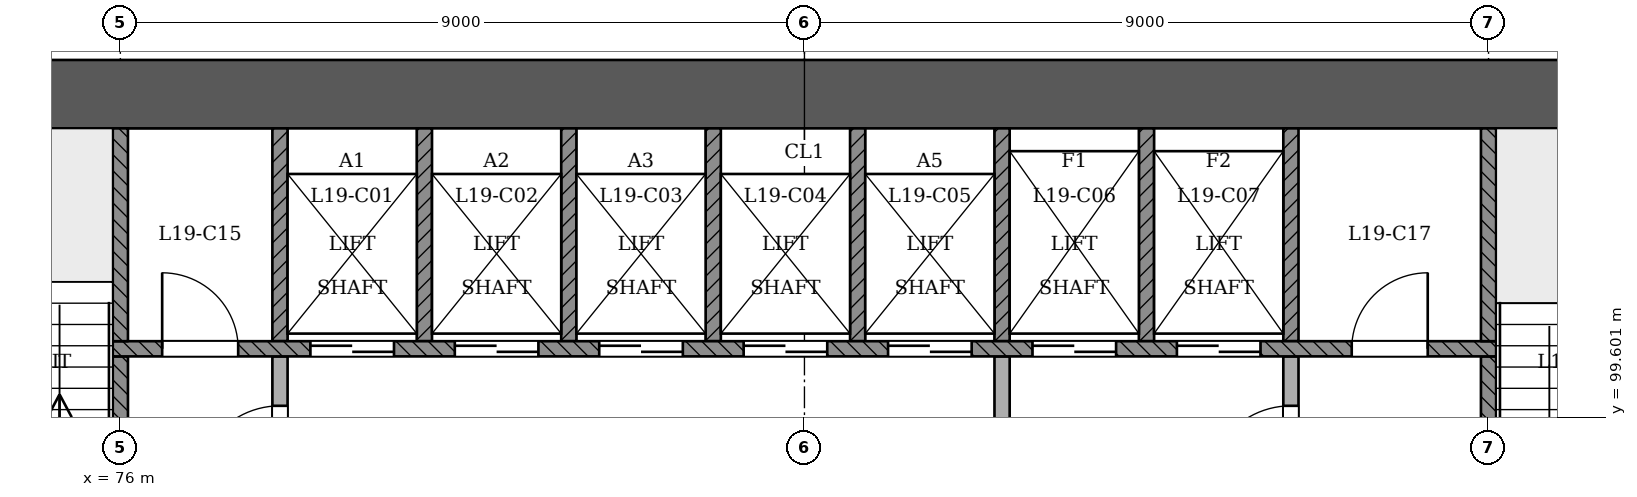
"""IFC4 building model, lengths in metres.
Left out: names, types, materials, properties, quantities, classifications, styles, units other than length and angle.
Written with IfcOpenShell. Run it as: python <this file> out.ifc"""

import sys

from ifc_helpers import new_model, si_unit, direction, frame, frame_2d, origin, place, context, subcontext, project, spatial, rectangle, extrude, element, fill, save


model = new_model("IFC4")
c1 = context("Model", 3, precision=1e-05, world=origin(), true_north=direction((0.0, 1.0)))
c2 = subcontext(c1, "Body", "Model", "MODEL_VIEW")
j1 = project(units=[si_unit("LENGTHUNIT", "METRE"), si_unit("PLANEANGLEUNIT", "RADIAN")], contexts=[c1])
p1 = place(None, origin())
s1 = spatial("IfcSite", under=j1, at=p1, CompositionType="ELEMENT")
p2 = place(p1, origin())
s2 = spatial("IfcBuilding", under=s1, at=p2, CompositionType="ELEMENT")
p3 = place(p2, frame((0.0, 0.0, 77.4)))
s3 = spatial("IfcBuildingStorey", under=s2, at=p3, CompositionType="ELEMENT", Elevation=77.4)
p4 = place(p3, frame((97.45, 103.85, 0.0), z_axis=(0.0, 0.0, 1.0), x_axis=(-1.0, 0.0, 0.0)))
e1 = element("IfcWall", 1, at=p4, inside=s3, PredefinedType="SHEAR", context=c2, shape_type="SweptSolid", body=[
    extrude(rectangle(XDim=25.35, YDim=0.9, at=frame_2d((12.675, 0.0))), origin(), (0.0, 0.0, 1.0), 3.6),
])
p5 = place(p3, frame((87.6, 93.4, 0.0), z_axis=(0.0, 0.0, 1.0), x_axis=(0.0, 1.0, 0.0)))
e2 = element("IfcWall", 2, at=p5, inside=s3, PredefinedType="PARTITIONING", context=c2, shape_type="SweptSolid", body=[
    extrude(rectangle(XDim=7.0, YDim=0.2, at=frame_2d((3.5, 0.0))), origin(), (0.0, 0.0, 1.0), 3.1),
])
p6 = place(p5, frame((4.45, 0.0, 0.0)))
e3 = element("IfcOpeningElement", 3, at=p6, cuts=e2, PredefinedType="OPENING", context=c2, shape_type="SweptSolid", body=[
    extrude(rectangle(XDim=1.1, YDim=2.1, at=frame_2d((0.55, 1.05))), frame((0.0, 0.11, 0.0), z_axis=(0.0, -1.0, 0.0), x_axis=(1.0, 0.0, 0.0)), (0.0, 0.0, 1.0), 0.221),
])
p7 = place(p3, frame((91.4, 96.2, 0.0), z_axis=(0.0, 0.0, 1.0), x_axis=(0.0, 1.0, 0.0)))
e4 = element("IfcWall", 4, at=p7, inside=s3, PredefinedType="PARTITIONING", context=c2, shape_type="SweptSolid", body=[
    extrude(rectangle(XDim=4.2, YDim=0.2, at=frame_2d((2.1, 0.0))), origin(), (0.0, 0.0, 1.0), 3.1),
])
p8 = place(p7, frame((2.45, 0.0, 0.0)))
e5 = element("IfcOpeningElement", 5, at=p8, cuts=e4, PredefinedType="OPENING", context=c2, shape_type="SweptSolid", body=[
    extrude(rectangle(XDim=1.1, YDim=2.1, at=frame_2d((0.55, 1.05))), frame((0.0, 0.11, 0.0), z_axis=(0.0, -1.0, 0.0), x_axis=(1.0, 0.0, 0.0)), (0.0, 0.0, 1.0), 0.221),
])
p9 = place(p3, frame((76.0, 96.7, 0.0), z_axis=(0.0, 0.0, 1.0), x_axis=(0.0, 1.0, 0.0)))
e6 = element("IfcWall", 6, at=p9, inside=s3, PredefinedType="SOLIDWALL", context=c2, shape_type="SweptSolid", body=[
    extrude(rectangle(XDim=3.7, YDim=0.2, at=frame_2d((1.85, 0.0))), origin(), (0.0, 0.0, 1.0), 3.1),
])
p10 = place(p9, frame((0.35, 0.0, 0.0)))
e7 = element("IfcOpeningElement", 7, at=p10, cuts=e6, PredefinedType="OPENING", context=c2, shape_type="SweptSolid", body=[
    extrude(rectangle(XDim=1.1, YDim=2.1, at=frame_2d((0.55, 1.05))), frame((0.0, 0.11, 0.0), z_axis=(0.0, -1.0, 0.0), x_axis=(1.0, 0.0, 0.0)), (0.0, 0.0, 1.0), 0.221),
])
p11 = place(p3, frame((78.1, 96.7, 0.0), z_axis=(0.0, 0.0, 1.0), x_axis=(0.0, 1.0, 0.0)))
e8 = element("IfcWall", 8, at=p11, inside=s3, PredefinedType="PARTITIONING", context=c2, shape_type="SweptSolid", body=[
    extrude(rectangle(XDim=3.7, YDim=0.2, at=frame_2d((1.85, 0.0))), origin(), (0.0, 0.0, 1.0), 3.1),
])
p12 = place(p11, frame((1.95, 0.0, 0.0)))
e9 = element("IfcOpeningElement", 9, at=p12, cuts=e8, PredefinedType="OPENING", context=c2, shape_type="SweptSolid", body=[
    extrude(rectangle(XDim=1.1, YDim=2.1, at=frame_2d((0.55, 1.05))), frame((0.0, 0.11, 0.0), z_axis=(0.0, -1.0, 0.0), x_axis=(1.0, 0.0, 0.0)), (0.0, 0.0, 1.0), 0.221),
])
p13 = place(p3, frame((94.0, 96.7, 0.0), z_axis=(0.0, 0.0, 1.0), x_axis=(0.0, 1.0, 0.0)))
e10 = element("IfcWall", 10, at=p13, inside=s3, PredefinedType="SOLIDWALL", context=c2, shape_type="SweptSolid", body=[
    extrude(rectangle(XDim=3.7, YDim=0.2, at=frame_2d((1.85, 0.0))), origin(), (0.0, 0.0, 1.0), 3.1),
])
p14 = place(p13, frame((0.35, 0.0, 0.0)))
e11 = element("IfcOpeningElement", 11, at=p14, cuts=e10, PredefinedType="OPENING", context=c2, shape_type="SweptSolid", body=[
    extrude(rectangle(XDim=1.1, YDim=2.1, at=frame_2d((0.55, 1.05))), frame((0.0, 0.11, 0.0), z_axis=(0.0, -1.0, 0.0), x_axis=(1.0, 0.0, 0.0)), (0.0, 0.0, 1.0), 0.221),
])
p15 = place(p3, frame((75.9, 100.5, 0.0), z_axis=(0.0, 0.0, 1.0), x_axis=(1.0, 0.0, 0.0)))
e12 = element("IfcWall", 12, at=p15, inside=s3, PredefinedType="SOLIDWALL", context=c2, shape_type="SweptSolid", body=[
    extrude(rectangle(XDim=18.2, YDim=0.2, at=frame_2d((9.1, 0.0))), origin(), (0.0, 0.0, 1.0), 3.1),
])
p16 = place(p15, frame((2.6, 0.0, 0.0)))
e13 = element("IfcOpeningElement", 13, at=p16, cuts=e12, PredefinedType="OPENING", context=c2, shape_type="SweptSolid", body=[
    extrude(rectangle(XDim=1.1, YDim=2.1, at=frame_2d((0.55, 1.05))), frame((0.0, 0.11, 0.0), z_axis=(0.0, -1.0, 0.0), x_axis=(1.0, 0.0, 0.0)), (0.0, 0.0, 1.0), 0.221),
])
p17 = place(p15, frame((4.5, 0.0, 0.0)))
e14 = element("IfcOpeningElement", 14, at=p17, cuts=e12, PredefinedType="OPENING", context=c2, shape_type="SweptSolid", body=[
    extrude(rectangle(XDim=1.1, YDim=2.1, at=frame_2d((0.55, 1.05))), frame((0.0, 0.11, 0.0), z_axis=(0.0, -1.0, 0.0), x_axis=(1.0, 0.0, 0.0)), (0.0, 0.0, 1.0), 0.221),
])
p18 = place(p15, frame((6.4, 0.0, 0.0)))
e15 = element("IfcOpeningElement", 15, at=p18, cuts=e12, PredefinedType="OPENING", context=c2, shape_type="SweptSolid", body=[
    extrude(rectangle(XDim=1.1, YDim=2.1, at=frame_2d((0.55, 1.05))), frame((0.0, 0.11, 0.0), z_axis=(0.0, -1.0, 0.0), x_axis=(1.0, 0.0, 0.0)), (0.0, 0.0, 1.0), 0.221),
])
p19 = place(p15, frame((8.3, 0.0, 0.0)))
e16 = element("IfcOpeningElement", 16, at=p19, cuts=e12, PredefinedType="OPENING", context=c2, shape_type="SweptSolid", body=[
    extrude(rectangle(XDim=1.1, YDim=2.1, at=frame_2d((0.55, 1.05))), frame((0.0, 0.11, 0.0), z_axis=(0.0, -1.0, 0.0), x_axis=(1.0, 0.0, 0.0)), (0.0, 0.0, 1.0), 0.221),
])
p20 = place(p15, frame((10.2, 0.0, 0.0)))
e17 = element("IfcOpeningElement", 17, at=p20, cuts=e12, PredefinedType="OPENING", context=c2, shape_type="SweptSolid", body=[
    extrude(rectangle(XDim=1.1, YDim=2.1, at=frame_2d((0.55, 1.05))), frame((0.0, 0.11, 0.0), z_axis=(0.0, -1.0, 0.0), x_axis=(1.0, 0.0, 0.0)), (0.0, 0.0, 1.0), 0.221),
])
p21 = place(p15, frame((12.1, 0.0, 0.0)))
e18 = element("IfcOpeningElement", 18, at=p21, cuts=e12, PredefinedType="OPENING", context=c2, shape_type="SweptSolid", body=[
    extrude(rectangle(XDim=1.1, YDim=2.1, at=frame_2d((0.55, 1.05))), frame((0.0, 0.11, 0.0), z_axis=(0.0, -1.0, 0.0), x_axis=(1.0, 0.0, 0.0)), (0.0, 0.0, 1.0), 0.221),
])
p22 = place(p15, frame((14.0, 0.0, 0.0)))
e19 = element("IfcOpeningElement", 19, at=p22, cuts=e12, PredefinedType="OPENING", context=c2, shape_type="SweptSolid", body=[
    extrude(rectangle(XDim=1.1, YDim=2.1, at=frame_2d((0.55, 1.05))), frame((0.0, 0.11, 0.0), z_axis=(0.0, -1.0, 0.0), x_axis=(1.0, 0.0, 0.0)), (0.0, 0.0, 1.0), 0.221),
])
p23 = place(p15, frame((0.65, 0.0, 0.0)))
e20 = element("IfcOpeningElement", 20, at=p23, cuts=e12, PredefinedType="OPENING", context=c2, shape_type="SweptSolid", body=[
    extrude(rectangle(XDim=1.0, YDim=2.1, at=frame_2d((0.5, 1.05))), frame((0.0, 0.11, 0.0), z_axis=(0.0, -1.0, 0.0), x_axis=(1.0, 0.0, 0.0)), (0.0, 0.0, 1.0), 0.221),
])
p24 = place(p15, frame((16.3, 0.0, 0.0)))
e21 = element("IfcOpeningElement", 21, at=p24, cuts=e12, PredefinedType="OPENING", context=c2, shape_type="SweptSolid", body=[
    extrude(rectangle(XDim=1.0, YDim=2.1, at=frame_2d((0.5, 1.05))), frame((0.0, 0.11, 0.0), z_axis=(0.0, -1.0, 0.0), x_axis=(1.0, 0.0, 0.0)), (0.0, 0.0, 1.0), 0.221),
])
for number, where, z_axis, x_axis in (
    (22, (76.0, 100.6, 0.0), (0.0, 0.0, 1.0), (0.0, 1.0, 0.0)),
    (23, (78.1, 100.6, 0.0), (0.0, 0.0, 1.0), (0.0, 1.0, 0.0)),
    (24, (80.0, 100.6, 0.0), (0.0, 0.0, 1.0), (0.0, 1.0, 0.0)),
    (25, (81.9, 100.6, 0.0), (0.0, 0.0, 1.0), (0.0, 1.0, 0.0)),
    (26, (83.8, 100.6, 0.0), (0.0, 0.0, 1.0), (0.0, 1.0, 0.0)),
    (27, (85.7, 100.6, 0.0), (0.0, 0.0, 1.0), (0.0, 1.0, 0.0)),
    (28, (87.6, 100.6, 0.0), (0.0, 0.0, 1.0), (0.0, 1.0, 0.0)),
    (29, (89.5, 100.6, 0.0), (0.0, 0.0, 1.0), (0.0, 1.0, 0.0)),
    (30, (91.4, 100.6, 0.0), (0.0, 0.0, 1.0), (0.0, 1.0, 0.0)),
    (31, (94.0, 100.6, 0.0), (0.0, 0.0, 1.0), (0.0, 1.0, 0.0)),
):
    element("IfcWall", number, at=place(p3, frame(where, z_axis=z_axis, x_axis=x_axis)), inside=s3, PredefinedType="SOLIDWALL", context=c2, shape_type="SweptSolid", body=[
        extrude(rectangle(XDim=2.8, YDim=0.2, at=frame_2d((1.4, 0.0))), origin(), (0.0, 0.0, 1.0), 3.1),
    ])
p25 = place(p16, origin())
e32 = element("IfcDoor", 32, at=p25, inside=s3, OperationType="SLIDING_TO_RIGHT", PredefinedType="NOTDEFINED", context=c2, shape_type="SweptSolid", body=[
    extrude(rectangle(XDim=1.1, YDim=2.1, at=frame_2d((0.55, 1.05))), frame((0.0, 0.025, 0.0), z_axis=(0.0, -1.0, 0.0), x_axis=(1.0, 0.0, 0.0)), (0.0, 0.0, 1.0), 0.05),
])
fill(e13, e32)
p26 = place(p17, origin())
e33 = element("IfcDoor", 33, at=p26, inside=s3, OperationType="SLIDING_TO_LEFT", PredefinedType="NOTDEFINED", context=c2, shape_type="SweptSolid", body=[
    extrude(rectangle(XDim=1.1, YDim=2.1, at=frame_2d((0.55, 1.05))), frame((0.0, 0.025, 0.0), z_axis=(0.0, -1.0, 0.0), x_axis=(1.0, 0.0, 0.0)), (0.0, 0.0, 1.0), 0.05),
])
fill(e14, e33)
p27 = place(p18, origin())
e34 = element("IfcDoor", 34, at=p27, inside=s3, OperationType="SLIDING_TO_RIGHT", PredefinedType="NOTDEFINED", context=c2, shape_type="SweptSolid", body=[
    extrude(rectangle(XDim=1.1, YDim=2.1, at=frame_2d((0.55, 1.05))), frame((0.0, 0.025, 0.0), z_axis=(0.0, -1.0, 0.0), x_axis=(1.0, 0.0, 0.0)), (0.0, 0.0, 1.0), 0.05),
])
fill(e15, e34)
p28 = place(p19, origin())
e35 = element("IfcDoor", 35, at=p28, inside=s3, OperationType="SLIDING_TO_LEFT", PredefinedType="NOTDEFINED", context=c2, shape_type="SweptSolid", body=[
    extrude(rectangle(XDim=1.1, YDim=2.1, at=frame_2d((0.55, 1.05))), frame((0.0, 0.025, 0.0), z_axis=(0.0, -1.0, 0.0), x_axis=(1.0, 0.0, 0.0)), (0.0, 0.0, 1.0), 0.05),
])
fill(e16, e35)
p29 = place(p20, origin())
e36 = element("IfcDoor", 36, at=p29, inside=s3, OperationType="SLIDING_TO_RIGHT", PredefinedType="NOTDEFINED", context=c2, shape_type="SweptSolid", body=[
    extrude(rectangle(XDim=1.1, YDim=2.1, at=frame_2d((0.55, 1.05))), frame((0.0, 0.025, 0.0), z_axis=(0.0, -1.0, 0.0), x_axis=(1.0, 0.0, 0.0)), (0.0, 0.0, 1.0), 0.05),
])
fill(e17, e36)
p30 = place(p21, origin())
e37 = element("IfcDoor", 37, at=p30, inside=s3, OperationType="SLIDING_TO_RIGHT", PredefinedType="NOTDEFINED", context=c2, shape_type="SweptSolid", body=[
    extrude(rectangle(XDim=1.1, YDim=2.1, at=frame_2d((0.55, 1.05))), frame((0.0, 0.025, 0.0), z_axis=(0.0, -1.0, 0.0), x_axis=(1.0, 0.0, 0.0)), (0.0, 0.0, 1.0), 0.05),
])
fill(e18, e37)
p31 = place(p22, origin())
e38 = element("IfcDoor", 38, at=p31, inside=s3, OperationType="SLIDING_TO_LEFT", PredefinedType="NOTDEFINED", context=c2, shape_type="SweptSolid", body=[
    extrude(rectangle(XDim=1.1, YDim=2.1, at=frame_2d((0.55, 1.05))), frame((0.0, 0.025, 0.0), z_axis=(0.0, -1.0, 0.0), x_axis=(1.0, 0.0, 0.0)), (0.0, 0.0, 1.0), 0.05),
])
fill(e19, e38)
p32 = place(p12, origin())
e39 = element("IfcDoor", 39, at=p32, inside=s3, OperationType="SINGLE_SWING_LEFT", PredefinedType="NOTDEFINED", context=c2, shape_type="SweptSolid", body=[
    extrude(rectangle(XDim=1.1, YDim=2.1, at=frame_2d((0.55, 1.05))), frame((0.0, 0.025, 0.0), z_axis=(0.0, -1.0, 0.0), x_axis=(1.0, 0.0, 0.0)), (0.0, 0.0, 1.0), 0.05),
])
fill(e9, e39)
p33 = place(p8, origin())
e40 = element("IfcDoor", 40, at=p33, inside=s3, OperationType="SINGLE_SWING_LEFT", PredefinedType="NOTDEFINED", context=c2, shape_type="SweptSolid", body=[
    extrude(rectangle(XDim=1.1, YDim=2.1, at=frame_2d((0.55, 1.05))), frame((0.0, 0.025, 0.0), z_axis=(0.0, -1.0, 0.0), x_axis=(1.0, 0.0, 0.0)), (0.0, 0.0, 1.0), 0.05),
])
fill(e5, e40)
p34 = place(p23, origin())
e41 = element("IfcDoor", 41, at=p34, inside=s3, OperationType="SINGLE_SWING_LEFT", PredefinedType="NOTDEFINED", context=c2, shape_type="SweptSolid", body=[
    extrude(rectangle(XDim=1.0, YDim=2.1, at=frame_2d((0.5, 1.05))), frame((0.0, 0.025, 0.0), z_axis=(0.0, -1.0, 0.0), x_axis=(1.0, 0.0, 0.0)), (0.0, 0.0, 1.0), 0.05),
])
fill(e20, e41)
p35 = place(p24, origin())
e42 = element("IfcDoor", 42, at=p35, inside=s3, OperationType="SINGLE_SWING_RIGHT", PredefinedType="NOTDEFINED", context=c2, shape_type="SweptSolid", body=[
    extrude(rectangle(XDim=1.0, YDim=2.1, at=frame_2d((0.5, 1.05))), frame((0.0, 0.025, 0.0), z_axis=(0.0, -1.0, 0.0), x_axis=(1.0, 0.0, 0.0)), (0.0, 0.0, 1.0), 0.05),
])
fill(e21, e42)
save(model, sys.argv[1])
